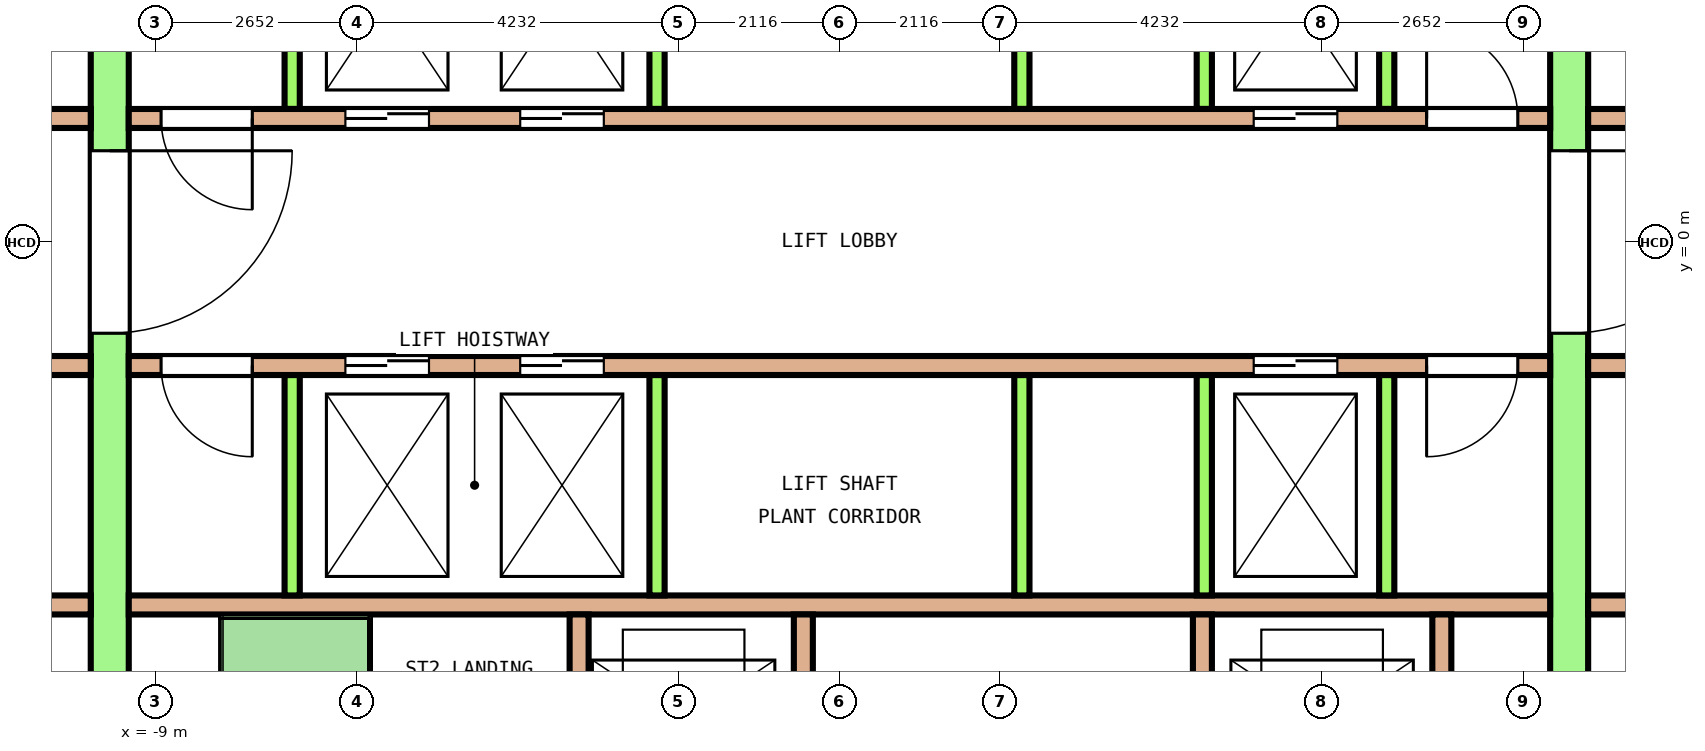
"""IFC4 building model, lengths in metres.
Left out: names, types, materials, properties, quantities, classifications, styles, units other than length and angle.
Written with IfcOpenShell. Run it as: python <this file> out.ifc"""

import sys

from ifc_helpers import new_model, si_unit, direction, frame, frame_2d, origin, place, context, subcontext, project, spatial, rectangle, extrude, element, fill, save


model = new_model("IFC4")
c1 = context("Model", 3, precision=1e-05, world=origin(), true_north=direction((0.0, 1.0)))
c2 = subcontext(c1, "Body", "Model", "MODEL_VIEW")
j1 = project(units=[si_unit("LENGTHUNIT", "METRE"), si_unit("PLANEANGLEUNIT", "RADIAN")], contexts=[c1])
p1 = place(None, origin())
s1 = spatial("IfcSite", under=j1, at=p1, CompositionType="ELEMENT")
p2 = place(p1, origin())
s2 = spatial("IfcBuilding", under=s1, at=p2, CompositionType="ELEMENT")
p3 = place(p2, frame((0.0, 0.0, 139.6)))
s3 = spatial("IfcBuildingStorey", under=s2, at=p3, CompositionType="ELEMENT", Elevation=139.6)
p4 = place(p3, frame((-9.6, -7.75, 0.0), z_axis=(0.0, 0.0, 1.0), x_axis=(0.0, 1.0, 0.0)))
e1 = element("IfcWall", 1, at=p4, inside=s3, PredefinedType="SHEAR", context=c2, shape_type="SweptSolid", body=[
    extrude(rectangle(XDim=15.5, YDim=0.5, at=frame_2d((7.75, 0.0))), origin(), (0.0, 0.0, 1.0), 5.3),
])
p5 = place(p4, frame((6.55, 0.0, 0.0)))
e2 = element("IfcOpeningElement", 2, at=p5, cuts=e1, PredefinedType="OPENING", context=c2, shape_type="SweptSolid", body=[
    extrude(rectangle(XDim=2.4, YDim=2.1, at=frame_2d((1.2, 1.05))), frame((0.0, 0.26, 0.0), z_axis=(0.0, -1.0, 0.0), x_axis=(1.0, 0.0, 0.0)), (0.0, 0.0, 1.0), 0.52),
])
p6 = place(p4, frame((13.45, 0.0, 0.0)))
e3 = element("IfcOpeningElement", 3, at=p6, cuts=e1, PredefinedType="OPENING", context=c2, shape_type="SweptSolid", body=[
    extrude(rectangle(XDim=1.2, YDim=2.1, at=frame_2d((0.6, 1.05))), frame((0.0, 0.26, 0.0), z_axis=(0.0, -1.0, 0.0), x_axis=(1.0, 0.0, 0.0)), (0.0, 0.0, 1.0), 0.52),
])
p7 = place(p4, frame((0.85, 0.0, 0.0)))
e4 = element("IfcOpeningElement", 4, at=p7, cuts=e1, PredefinedType="OPENING", context=c2, shape_type="SweptSolid", body=[
    extrude(rectangle(XDim=1.2, YDim=2.1, at=frame_2d((0.6, 1.05))), frame((0.0, 0.26, 0.0), z_axis=(0.0, -1.0, 0.0), x_axis=(1.0, 0.0, 0.0)), (0.0, 0.0, 1.0), 0.52),
])
p8 = place(p3, frame((9.6, -7.75, 0.0), z_axis=(0.0, 0.0, 1.0), x_axis=(0.0, 1.0, 0.0)))
e5 = element("IfcWall", 5, at=p8, inside=s3, PredefinedType="SHEAR", context=c2, shape_type="SweptSolid", body=[
    extrude(rectangle(XDim=15.5, YDim=0.5, at=frame_2d((7.75, 0.0))), origin(), (0.0, 0.0, 1.0), 5.3),
])
p9 = place(p8, frame((6.55, 0.0, 0.0)))
e6 = element("IfcOpeningElement", 6, at=p9, cuts=e5, PredefinedType="OPENING", context=c2, shape_type="SweptSolid", body=[
    extrude(rectangle(XDim=2.4, YDim=2.1, at=frame_2d((1.2, 1.05))), frame((0.0, 0.26, 0.0), z_axis=(0.0, -1.0, 0.0), x_axis=(1.0, 0.0, 0.0)), (0.0, 0.0, 1.0), 0.52),
])
p10 = place(p8, frame((13.45, 0.0, 0.0)))
e7 = element("IfcOpeningElement", 7, at=p10, cuts=e5, PredefinedType="OPENING", context=c2, shape_type="SweptSolid", body=[
    extrude(rectangle(XDim=1.2, YDim=2.1, at=frame_2d((0.6, 1.05))), frame((0.0, 0.26, 0.0), z_axis=(0.0, -1.0, 0.0), x_axis=(1.0, 0.0, 0.0)), (0.0, 0.0, 1.0), 0.52),
])
p11 = place(p8, frame((0.95, 0.0, 0.0)))
e8 = element("IfcOpeningElement", 8, at=p11, cuts=e5, PredefinedType="OPENING", context=c2, shape_type="SweptSolid", body=[
    extrude(rectangle(XDim=1.0, YDim=2.1, at=frame_2d((0.5, 1.05))), frame((0.0, 0.26, 0.0), z_axis=(0.0, -1.0, 0.0), x_axis=(1.0, 0.0, 0.0)), (0.0, 0.0, 1.0), 0.52),
])
p12 = place(p3, frame((-12.85, 1.625, 0.0), z_axis=(0.0, 0.0, 1.0), x_axis=(1.0, 0.0, 0.0)))
e9 = element("IfcWall", 9, at=p12, inside=s3, PredefinedType="SOLIDWALL", context=c2, shape_type="SweptSolid", body=[
    extrude(rectangle(XDim=3.0, YDim=0.25, at=frame_2d((1.5, 0.0))), origin(), (0.0, 0.0, 1.0), 5.3),
])
p13 = place(p12, frame((0.9, 0.0, 0.0)))
e10 = element("IfcOpeningElement", 10, at=p13, cuts=e9, PredefinedType="OPENING", context=c2, shape_type="SweptSolid", body=[
    extrude(rectangle(XDim=1.2, YDim=2.1, at=frame_2d((0.6, 1.05))), frame((0.0, 0.135, 0.0), z_axis=(0.0, -1.0, 0.0), x_axis=(1.0, 0.0, 0.0)), (0.0, 0.0, 1.0), 0.27),
])
p14 = place(p3, frame((-9.35, 1.625, 0.0), z_axis=(0.0, 0.0, 1.0), x_axis=(1.0, 0.0, 0.0)))
e11 = element("IfcWall", 11, at=p14, inside=s3, PredefinedType="SOLIDWALL", context=c2, shape_type="SweptSolid", body=[
    extrude(rectangle(XDim=18.7, YDim=0.25, at=frame_2d((9.35, 0.0))), origin(), (0.0, 0.0, 1.0), 5.3),
])
p15 = place(p14, frame((2.85, 0.0, 0.0)))
e12 = element("IfcOpeningElement", 12, at=p15, cuts=e11, PredefinedType="OPENING", context=c2, shape_type="SweptSolid", body=[
    extrude(rectangle(XDim=1.1, YDim=2.1, at=frame_2d((0.55, 1.05))), frame((0.0, 0.135, 0.0), z_axis=(0.0, -1.0, 0.0), x_axis=(1.0, 0.0, 0.0)), (0.0, 0.0, 1.0), 0.27),
])
p16 = place(p14, frame((5.15, 0.0, 0.0)))
e13 = element("IfcOpeningElement", 13, at=p16, cuts=e11, PredefinedType="OPENING", context=c2, shape_type="SweptSolid", body=[
    extrude(rectangle(XDim=1.1, YDim=2.1, at=frame_2d((0.55, 1.05))), frame((0.0, 0.135, 0.0), z_axis=(0.0, -1.0, 0.0), x_axis=(1.0, 0.0, 0.0)), (0.0, 0.0, 1.0), 0.27),
])
p17 = place(p14, frame((14.8, 0.0, 0.0)))
e14 = element("IfcOpeningElement", 14, at=p17, cuts=e11, PredefinedType="OPENING", context=c2, shape_type="SweptSolid", body=[
    extrude(rectangle(XDim=1.1, YDim=2.1, at=frame_2d((0.55, 1.05))), frame((0.0, 0.135, 0.0), z_axis=(0.0, -1.0, 0.0), x_axis=(1.0, 0.0, 0.0)), (0.0, 0.0, 1.0), 0.27),
])
p18 = place(p14, frame((0.425, 0.0, 0.0)))
e15 = element("IfcOpeningElement", 15, at=p18, cuts=e11, PredefinedType="OPENING", context=c2, shape_type="SweptSolid", body=[
    extrude(rectangle(XDim=1.2, YDim=2.1, at=frame_2d((0.6, 1.05))), frame((0.0, 0.135, 0.0), z_axis=(0.0, -1.0, 0.0), x_axis=(1.0, 0.0, 0.0)), (0.0, 0.0, 1.0), 0.27),
])
p19 = place(p14, frame((17.075, 0.0, 0.0)))
e16 = element("IfcOpeningElement", 16, at=p19, cuts=e11, PredefinedType="OPENING", context=c2, shape_type="SweptSolid", body=[
    extrude(rectangle(XDim=1.2, YDim=2.1, at=frame_2d((0.6, 1.05))), frame((0.0, 0.135, 0.0), z_axis=(0.0, -1.0, 0.0), x_axis=(1.0, 0.0, 0.0)), (0.0, 0.0, 1.0), 0.27),
])
p20 = place(p3, frame((9.85, 1.625, 0.0), z_axis=(0.0, 0.0, 1.0), x_axis=(1.0, 0.0, 0.0)))
e17 = element("IfcWall", 17, at=p20, inside=s3, PredefinedType="SOLIDWALL", context=c2, shape_type="SweptSolid", body=[
    extrude(rectangle(XDim=3.0, YDim=0.25, at=frame_2d((1.5, 0.0))), origin(), (0.0, 0.0, 1.0), 5.3),
])
p21 = place(p20, frame((0.9, 0.0, 0.0)))
e18 = element("IfcOpeningElement", 18, at=p21, cuts=e17, PredefinedType="OPENING", context=c2, shape_type="SweptSolid", body=[
    extrude(rectangle(XDim=1.2, YDim=2.1, at=frame_2d((0.6, 1.05))), frame((0.0, 0.135, 0.0), z_axis=(0.0, -1.0, 0.0), x_axis=(1.0, 0.0, 0.0)), (0.0, 0.0, 1.0), 0.27),
])
for number, where, z_axis, x_axis in (
    (19, (-7.2, 1.75, 0.0), (0.0, 0.0, 1.0), (0.0, 1.0, 0.0)),
    (20, (-2.4, 1.75, 0.0), (0.0, 0.0, 1.0), (0.0, 1.0, 0.0)),
    (21, (2.4, 1.75, 0.0), (0.0, 0.0, 1.0), (0.0, 1.0, 0.0)),
    (22, (4.8, 1.75, 0.0), (0.0, 0.0, 1.0), (0.0, 1.0, 0.0)),
    (23, (7.2, 1.75, 0.0), (0.0, 0.0, 1.0), (0.0, 1.0, 0.0)),
):
    element("IfcWall", number, at=place(p3, frame(where, z_axis=z_axis, x_axis=x_axis)), inside=s3, PredefinedType="SOLIDWALL", context=c2, shape_type="SweptSolid", body=[
        extrude(rectangle(XDim=2.9, YDim=0.2, at=frame_2d((1.45, 0.0))), origin(), (0.0, 0.0, 1.0), 5.3),
    ])
p22 = place(p3, frame((-12.85, -1.625, 0.0), z_axis=(0.0, 0.0, 1.0), x_axis=(1.0, 0.0, 0.0)))
e24 = element("IfcWall", 24, at=p22, inside=s3, PredefinedType="SOLIDWALL", context=c2, shape_type="SweptSolid", body=[
    extrude(rectangle(XDim=3.0, YDim=0.25, at=frame_2d((1.5, 0.0))), origin(), (0.0, 0.0, 1.0), 5.3),
])
p23 = place(p22, frame((0.9, 0.0, 0.0)))
e25 = element("IfcOpeningElement", 25, at=p23, cuts=e24, PredefinedType="OPENING", context=c2, shape_type="SweptSolid", body=[
    extrude(rectangle(XDim=1.2, YDim=2.1, at=frame_2d((0.6, 1.05))), frame((0.0, 0.135, 0.0), z_axis=(0.0, -1.0, 0.0), x_axis=(1.0, 0.0, 0.0)), (0.0, 0.0, 1.0), 0.27),
])
p24 = place(p3, frame((-9.35, -1.625, 0.0), z_axis=(0.0, 0.0, 1.0), x_axis=(1.0, 0.0, 0.0)))
e26 = element("IfcWall", 26, at=p24, inside=s3, PredefinedType="SOLIDWALL", context=c2, shape_type="SweptSolid", body=[
    extrude(rectangle(XDim=18.7, YDim=0.25, at=frame_2d((9.35, 0.0))), origin(), (0.0, 0.0, 1.0), 5.3),
])
p25 = place(p24, frame((2.85, 0.0, 0.0)))
e27 = element("IfcOpeningElement", 27, at=p25, cuts=e26, PredefinedType="OPENING", context=c2, shape_type="SweptSolid", body=[
    extrude(rectangle(XDim=1.1, YDim=2.1, at=frame_2d((0.55, 1.05))), frame((0.0, 0.135, 0.0), z_axis=(0.0, -1.0, 0.0), x_axis=(1.0, 0.0, 0.0)), (0.0, 0.0, 1.0), 0.27),
])
p26 = place(p24, frame((5.15, 0.0, 0.0)))
e28 = element("IfcOpeningElement", 28, at=p26, cuts=e26, PredefinedType="OPENING", context=c2, shape_type="SweptSolid", body=[
    extrude(rectangle(XDim=1.1, YDim=2.1, at=frame_2d((0.55, 1.05))), frame((0.0, 0.135, 0.0), z_axis=(0.0, -1.0, 0.0), x_axis=(1.0, 0.0, 0.0)), (0.0, 0.0, 1.0), 0.27),
])
p27 = place(p24, frame((14.8, 0.0, 0.0)))
e29 = element("IfcOpeningElement", 29, at=p27, cuts=e26, PredefinedType="OPENING", context=c2, shape_type="SweptSolid", body=[
    extrude(rectangle(XDim=1.1, YDim=2.1, at=frame_2d((0.55, 1.05))), frame((0.0, 0.135, 0.0), z_axis=(0.0, -1.0, 0.0), x_axis=(1.0, 0.0, 0.0)), (0.0, 0.0, 1.0), 0.27),
])
p28 = place(p24, frame((0.425, 0.0, 0.0)))
e30 = element("IfcOpeningElement", 30, at=p28, cuts=e26, PredefinedType="OPENING", context=c2, shape_type="SweptSolid", body=[
    extrude(rectangle(XDim=1.2, YDim=2.1, at=frame_2d((0.6, 1.05))), frame((0.0, 0.135, 0.0), z_axis=(0.0, -1.0, 0.0), x_axis=(1.0, 0.0, 0.0)), (0.0, 0.0, 1.0), 0.27),
])
p29 = place(p24, frame((17.075, 0.0, 0.0)))
e31 = element("IfcOpeningElement", 31, at=p29, cuts=e26, PredefinedType="OPENING", context=c2, shape_type="SweptSolid", body=[
    extrude(rectangle(XDim=1.2, YDim=2.1, at=frame_2d((0.6, 1.05))), frame((0.0, 0.135, 0.0), z_axis=(0.0, -1.0, 0.0), x_axis=(1.0, 0.0, 0.0)), (0.0, 0.0, 1.0), 0.27),
])
p30 = place(p3, frame((9.85, -1.625, 0.0), z_axis=(0.0, 0.0, 1.0), x_axis=(1.0, 0.0, 0.0)))
e32 = element("IfcWall", 32, at=p30, inside=s3, PredefinedType="SOLIDWALL", context=c2, shape_type="SweptSolid", body=[
    extrude(rectangle(XDim=3.0, YDim=0.25, at=frame_2d((1.5, 0.0))), origin(), (0.0, 0.0, 1.0), 5.3),
])
p31 = place(p30, frame((0.9, 0.0, 0.0)))
e33 = element("IfcOpeningElement", 33, at=p31, cuts=e32, PredefinedType="OPENING", context=c2, shape_type="SweptSolid", body=[
    extrude(rectangle(XDim=1.2, YDim=2.1, at=frame_2d((0.6, 1.05))), frame((0.0, 0.135, 0.0), z_axis=(0.0, -1.0, 0.0), x_axis=(1.0, 0.0, 0.0)), (0.0, 0.0, 1.0), 0.27),
])
p32 = place(p3, frame((-12.85, -4.775, 0.0), z_axis=(0.0, 0.0, 1.0), x_axis=(1.0, 0.0, 0.0)))
e34 = element("IfcWall", 34, at=p32, inside=s3, PredefinedType="SOLIDWALL", context=c2, shape_type="SweptSolid", body=[
    extrude(rectangle(XDim=3.0, YDim=0.25, at=frame_2d((1.5, 0.0))), origin(), (0.0, 0.0, 1.0), 5.3),
])
p33 = place(p3, frame((-9.35, -4.775, 0.0), z_axis=(0.0, 0.0, 1.0), x_axis=(1.0, 0.0, 0.0)))
e35 = element("IfcWall", 35, at=p33, inside=s3, PredefinedType="SOLIDWALL", context=c2, shape_type="SweptSolid", body=[
    extrude(rectangle(XDim=18.7, YDim=0.25, at=frame_2d((9.35, 0.0))), origin(), (0.0, 0.0, 1.0), 5.3),
])
p34 = place(p3, frame((9.85, -4.775, 0.0), z_axis=(0.0, 0.0, 1.0), x_axis=(1.0, 0.0, 0.0)))
e36 = element("IfcWall", 36, at=p34, inside=s3, PredefinedType="SOLIDWALL", context=c2, shape_type="SweptSolid", body=[
    extrude(rectangle(XDim=3.0, YDim=0.25, at=frame_2d((1.5, 0.0))), origin(), (0.0, 0.0, 1.0), 5.3),
])
for number, where, z_axis, x_axis in (
    (37, (-7.2, -4.65, 0.0), (0.0, 0.0, 1.0), (0.0, 1.0, 0.0)),
    (38, (-2.4, -4.65, 0.0), (0.0, 0.0, 1.0), (0.0, 1.0, 0.0)),
    (39, (2.4, -4.65, 0.0), (0.0, 0.0, 1.0), (0.0, 1.0, 0.0)),
    (40, (4.8, -4.65, 0.0), (0.0, 0.0, 1.0), (0.0, 1.0, 0.0)),
    (41, (7.2, -4.65, 0.0), (0.0, 0.0, 1.0), (0.0, 1.0, 0.0)),
):
    element("IfcWall", number, at=place(p3, frame(where, z_axis=z_axis, x_axis=x_axis)), inside=s3, PredefinedType="SOLIDWALL", context=c2, shape_type="SweptSolid", body=[
        extrude(rectangle(XDim=2.9, YDim=0.2, at=frame_2d((1.45, 0.0))), origin(), (0.0, 0.0, 1.0), 5.3),
    ])
p35 = place(p3, frame((-3.425, -7.75, 0.0), z_axis=(0.0, 0.0, 1.0), x_axis=(0.0, 1.0, 0.0)))
e42 = element("IfcWall", 42, at=p35, inside=s3, PredefinedType="SOLIDWALL", context=c2, shape_type="SweptSolid", body=[
    extrude(rectangle(XDim=2.85, YDim=0.25, at=frame_2d((1.425, 0.0))), origin(), (0.0, 0.0, 1.0), 5.3),
])
p36 = place(p3, frame((-0.475, -7.75, 0.0), z_axis=(0.0, 0.0, 1.0), x_axis=(0.0, 1.0, 0.0)))
e43 = element("IfcWall", 43, at=p36, inside=s3, PredefinedType="SOLIDWALL", context=c2, shape_type="SweptSolid", body=[
    extrude(rectangle(XDim=2.85, YDim=0.25, at=frame_2d((1.425, 0.0))), origin(), (0.0, 0.0, 1.0), 5.3),
])
p37 = place(p36, frame((0.875, 0.0, 0.0)))
e44 = element("IfcOpeningElement", 44, at=p37, cuts=e43, PredefinedType="OPENING", context=c2, shape_type="SweptSolid", body=[
    extrude(rectangle(XDim=1.1, YDim=2.1, at=frame_2d((0.55, 1.05))), frame((0.0, 0.135, 0.0), z_axis=(0.0, -1.0, 0.0), x_axis=(1.0, 0.0, 0.0)), (0.0, 0.0, 1.0), 0.27),
])
p38 = place(p3, frame((4.775, -7.75, 0.0), z_axis=(0.0, 0.0, 1.0), x_axis=(0.0, 1.0, 0.0)))
e45 = element("IfcWall", 45, at=p38, inside=s3, PredefinedType="SOLIDWALL", context=c2, shape_type="SweptSolid", body=[
    extrude(rectangle(XDim=2.85, YDim=0.25, at=frame_2d((1.425, 0.0))), origin(), (0.0, 0.0, 1.0), 5.3),
])
p39 = place(p38, frame((0.875, 0.0, 0.0)))
e46 = element("IfcOpeningElement", 46, at=p39, cuts=e45, PredefinedType="OPENING", context=c2, shape_type="SweptSolid", body=[
    extrude(rectangle(XDim=1.1, YDim=2.1, at=frame_2d((0.55, 1.05))), frame((0.0, 0.135, 0.0), z_axis=(0.0, -1.0, 0.0), x_axis=(1.0, 0.0, 0.0)), (0.0, 0.0, 1.0), 0.27),
])
p40 = place(p3, frame((7.925, -7.75, 0.0), z_axis=(0.0, 0.0, 1.0), x_axis=(0.0, 1.0, 0.0)))
e47 = element("IfcWall", 47, at=p40, inside=s3, PredefinedType="SOLIDWALL", context=c2, shape_type="SweptSolid", body=[
    extrude(rectangle(XDim=2.85, YDim=0.25, at=frame_2d((1.425, 0.0))), origin(), (0.0, 0.0, 1.0), 5.3),
])
p41 = place(p15, origin())
e48 = element("IfcDoor", 48, at=p41, inside=s3, OperationType="DOUBLE_DOOR_SLIDING", PredefinedType="DOOR", context=c2, shape_type="SweptSolid", body=[
    extrude(rectangle(XDim=1.1, YDim=2.1, at=frame_2d((0.55, 1.05))), frame((0.0, 0.075, 0.0), z_axis=(0.0, -1.0, 0.0), x_axis=(1.0, 0.0, 0.0)), (0.0, 0.0, 1.0), 0.15),
])
fill(e12, e48)
p42 = place(p16, origin())
e49 = element("IfcDoor", 49, at=p42, inside=s3, OperationType="DOUBLE_DOOR_SLIDING", PredefinedType="DOOR", context=c2, shape_type="SweptSolid", body=[
    extrude(rectangle(XDim=1.1, YDim=2.1, at=frame_2d((0.55, 1.05))), frame((0.0, 0.075, 0.0), z_axis=(0.0, -1.0, 0.0), x_axis=(1.0, 0.0, 0.0)), (0.0, 0.0, 1.0), 0.15),
])
fill(e13, e49)
p43 = place(p17, origin())
e50 = element("IfcDoor", 50, at=p43, inside=s3, OperationType="DOUBLE_DOOR_SLIDING", PredefinedType="DOOR", context=c2, shape_type="SweptSolid", body=[
    extrude(rectangle(XDim=1.1, YDim=2.1, at=frame_2d((0.55, 1.05))), frame((0.0, 0.075, 0.0), z_axis=(0.0, -1.0, 0.0), x_axis=(1.0, 0.0, 0.0)), (0.0, 0.0, 1.0), 0.15),
])
fill(e14, e50)
p44 = place(p25, origin())
e51 = element("IfcDoor", 51, at=p44, inside=s3, OperationType="DOUBLE_DOOR_SLIDING", PredefinedType="DOOR", context=c2, shape_type="SweptSolid", body=[
    extrude(rectangle(XDim=1.1, YDim=2.1, at=frame_2d((0.55, 1.05))), frame((0.0, 0.075, 0.0), z_axis=(0.0, -1.0, 0.0), x_axis=(1.0, 0.0, 0.0)), (0.0, 0.0, 1.0), 0.15),
])
fill(e27, e51)
p45 = place(p26, origin())
e52 = element("IfcDoor", 52, at=p45, inside=s3, OperationType="DOUBLE_DOOR_SLIDING", PredefinedType="DOOR", context=c2, shape_type="SweptSolid", body=[
    extrude(rectangle(XDim=1.1, YDim=2.1, at=frame_2d((0.55, 1.05))), frame((0.0, 0.075, 0.0), z_axis=(0.0, -1.0, 0.0), x_axis=(1.0, 0.0, 0.0)), (0.0, 0.0, 1.0), 0.15),
])
fill(e28, e52)
p46 = place(p27, origin())
e53 = element("IfcDoor", 53, at=p46, inside=s3, OperationType="DOUBLE_DOOR_SLIDING", PredefinedType="DOOR", context=c2, shape_type="SweptSolid", body=[
    extrude(rectangle(XDim=1.1, YDim=2.1, at=frame_2d((0.55, 1.05))), frame((0.0, 0.075, 0.0), z_axis=(0.0, -1.0, 0.0), x_axis=(1.0, 0.0, 0.0)), (0.0, 0.0, 1.0), 0.15),
])
fill(e29, e53)
p47 = place(p5, origin())
e54 = element("IfcDoor", 54, at=p47, inside=s3, OperationType="DOUBLE_DOOR_SINGLE_SWING", PredefinedType="DOOR", context=c2, shape_type="SweptSolid", body=[
    extrude(rectangle(XDim=2.4, YDim=2.1, at=frame_2d((1.2, 1.05))), frame((0.0, 0.2, 0.0), z_axis=(0.0, -1.0, 0.0), x_axis=(1.0, 0.0, 0.0)), (0.0, 0.0, 1.0), 0.4),
])
fill(e2, e54)
p48 = place(p9, origin())
e55 = element("IfcDoor", 55, at=p48, inside=s3, OperationType="DOUBLE_DOOR_SINGLE_SWING", PredefinedType="DOOR", context=c2, shape_type="SweptSolid", body=[
    extrude(rectangle(XDim=2.4, YDim=2.1, at=frame_2d((1.2, 1.05))), frame((0.0, 0.2, 0.0), z_axis=(0.0, -1.0, 0.0), x_axis=(1.0, 0.0, 0.0)), (0.0, 0.0, 1.0), 0.4),
])
fill(e6, e55)
p49 = place(p18, origin())
e56 = element("IfcDoor", 56, at=p49, inside=s3, OperationType="SINGLE_SWING_LEFT", PredefinedType="DOOR", context=c2, shape_type="SweptSolid", body=[
    extrude(rectangle(XDim=1.2, YDim=2.1, at=frame_2d((0.6, 1.05))), frame((0.0, 0.075, 0.0), z_axis=(0.0, -1.0, 0.0), x_axis=(1.0, 0.0, 0.0)), (0.0, 0.0, 1.0), 0.15),
])
fill(e15, e56)
p50 = place(p19, origin())
e57 = element("IfcDoor", 57, at=p50, inside=s3, OperationType="SINGLE_SWING_RIGHT", PredefinedType="DOOR", context=c2, shape_type="SweptSolid", body=[
    extrude(rectangle(XDim=1.2, YDim=2.1, at=frame_2d((0.6, 1.05))), frame((0.0, 0.075, 0.0), z_axis=(0.0, -1.0, 0.0), x_axis=(1.0, 0.0, 0.0)), (0.0, 0.0, 1.0), 0.15),
])
fill(e16, e57)
p51 = place(p28, origin())
e58 = element("IfcDoor", 58, at=p51, inside=s3, OperationType="SINGLE_SWING_LEFT", PredefinedType="DOOR", context=c2, shape_type="SweptSolid", body=[
    extrude(rectangle(XDim=1.2, YDim=2.1, at=frame_2d((0.6, 1.05))), frame((0.0, 0.075, 0.0), z_axis=(0.0, -1.0, 0.0), x_axis=(1.0, 0.0, 0.0)), (0.0, 0.0, 1.0), 0.15),
])
fill(e30, e58)
p52 = place(p29, origin())
e59 = element("IfcDoor", 59, at=p52, inside=s3, OperationType="SINGLE_SWING_RIGHT", PredefinedType="DOOR", context=c2, shape_type="SweptSolid", body=[
    extrude(rectangle(XDim=1.2, YDim=2.1, at=frame_2d((0.6, 1.05))), frame((0.0, 0.075, 0.0), z_axis=(0.0, -1.0, 0.0), x_axis=(1.0, 0.0, 0.0)), (0.0, 0.0, 1.0), 0.15),
])
fill(e31, e59)
save(model, sys.argv[1])
